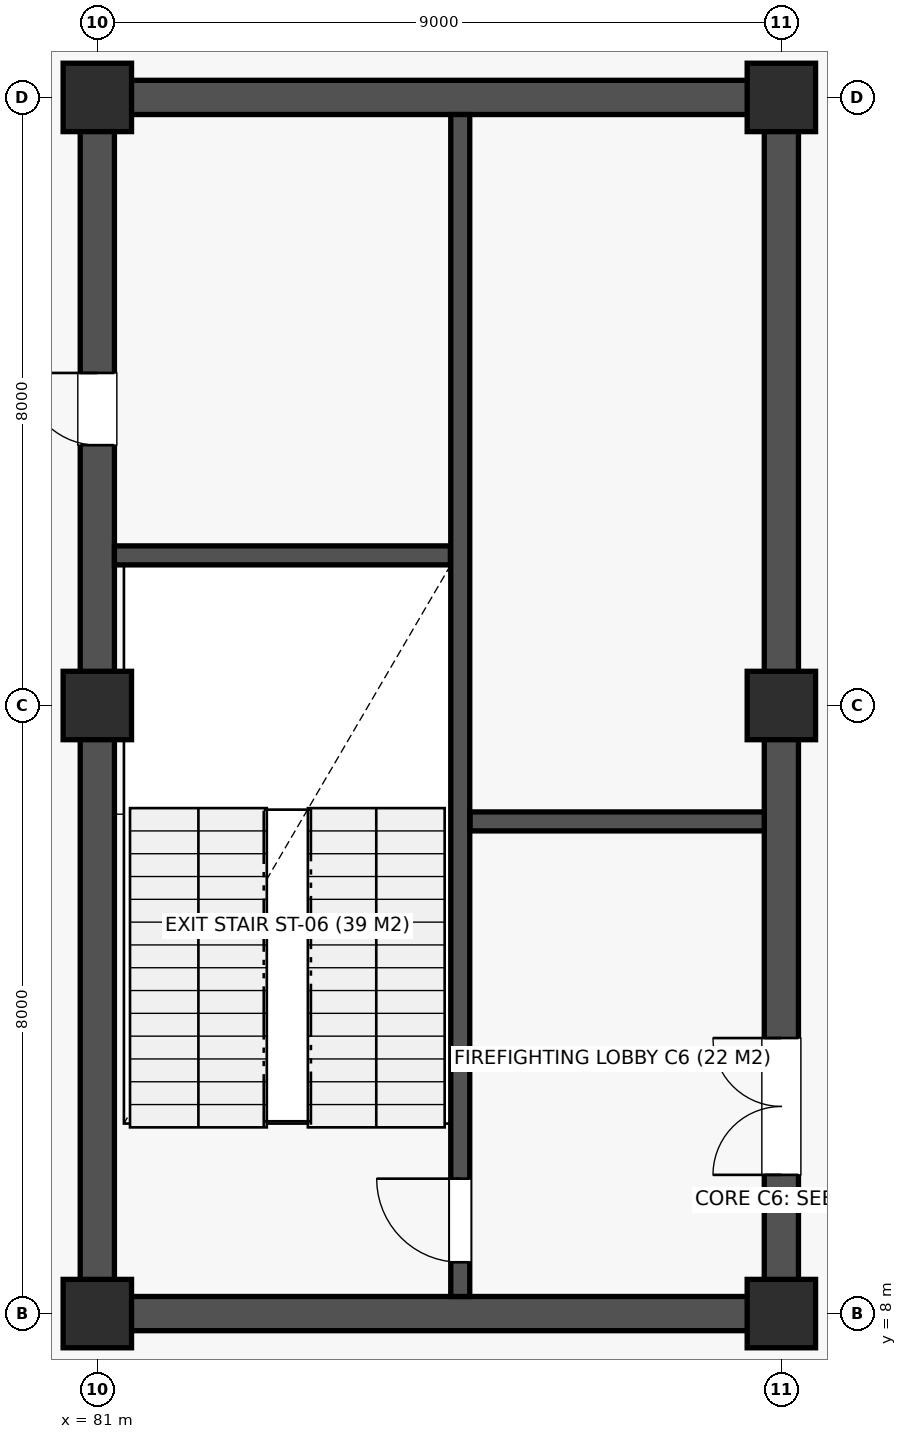
"""IFC4 building model, lengths in metres.
Left out: names, types, materials, properties, quantities, classifications, styles, units other than length and angle.
Written with IfcOpenShell. Run it as: python <this file> out.ifc"""

import sys

from ifc_helpers import new_model, si_unit, direction, frame, frame_2d, origin, origin_2d, place, context, subcontext, project, spatial, rectangle, extrude, element, fill, save


model = new_model("IFC4")
c1 = context("Model", 3, precision=1e-05, world=origin(), true_north=direction((0.0, 1.0)))
c2 = subcontext(c1, "Body", "Model", "MODEL_VIEW")
j1 = project(units=[si_unit("LENGTHUNIT", "METRE"), si_unit("PLANEANGLEUNIT", "RADIAN")], contexts=[c1])
p1 = place(None, origin())
s1 = spatial("IfcSite", under=j1, at=p1, CompositionType="ELEMENT")
p2 = place(p1, origin())
s2 = spatial("IfcBuilding", under=s1, at=p2, CompositionType="ELEMENT")
p3 = place(p2, frame((0.0, 0.0, -4.5)))
s3 = spatial("IfcBuildingStorey", under=s2, at=p3, CompositionType="ELEMENT", Elevation=-4.5)
for number, where, z_axis, x_axis in (
    (1, (81.0, 8.0, 0.0), (0.0, 0.0, 1.0), (1.0, 0.0, 0.0)),
    (2, (81.0, 16.0, 0.0), (0.0, 0.0, 1.0), (1.0, 0.0, 0.0)),
    (3, (81.0, 24.0, 0.0), (0.0, 0.0, 1.0), (1.0, 0.0, 0.0)),
    (4, (90.0, 8.0, 0.0), (0.0, 0.0, 1.0), (1.0, 0.0, 0.0)),
    (5, (90.0, 16.0, 0.0), (0.0, 0.0, 1.0), (1.0, 0.0, 0.0)),
    (6, (90.0, 24.0, 0.0), (0.0, 0.0, 1.0), (1.0, 0.0, 0.0)),
):
    element("IfcColumn", number, at=place(p3, frame(where, z_axis=z_axis, x_axis=x_axis)), inside=s3, PredefinedType="COLUMN", context=c2, shape_type="SweptSolid", body=[
        extrude(rectangle(XDim=0.9, YDim=0.9, at=origin_2d()), origin(), (0.0, 0.0, 1.0), 4.5),
    ])
for number, where, z_axis, x_axis in (
    (7, (81.225, 8.0, 0.0), (0.0, 0.0, 1.0), (1.0, 0.0, 0.0)),
    (8, (81.225, 24.0, 0.0), (0.0, 0.0, 1.0), (1.0, 0.0, 0.0)),
):
    element("IfcWall", number, at=place(p3, frame(where, z_axis=z_axis, x_axis=x_axis)), inside=s3, PredefinedType="SHEAR", context=c2, shape_type="SweptSolid", body=[
        extrude(rectangle(XDim=8.55, YDim=0.45, at=frame_2d((4.275, 0.0))), origin(), (0.0, 0.0, 1.0), 4.15),
    ])
p4 = place(p3, frame((81.0, 8.225, 0.0), z_axis=(0.0, 0.0, 1.0), x_axis=(0.0, 1.0, 0.0)))
e9 = element("IfcWall", 9, at=p4, inside=s3, PredefinedType="SHEAR", context=c2, shape_type="SweptSolid", body=[
    extrude(rectangle(XDim=15.55, YDim=0.45, at=frame_2d((7.775, 0.0))), origin(), (0.0, 0.0, 1.0), 4.15),
])
p5 = place(p4, frame((11.2, 0.0, 0.0)))
e10 = element("IfcOpeningElement", 10, at=p5, cuts=e9, PredefinedType="OPENING", context=c2, shape_type="SweptSolid", body=[
    extrude(rectangle(XDim=0.95, YDim=2.1, at=frame_2d((0.475, 1.05))), frame((0.0, 0.237, 0.0), z_axis=(0.0, -1.0, 0.0), x_axis=(1.0, 0.0, 0.0)), (0.0, 0.0, 1.0), 0.474),
])
p6 = place(p3, frame((90.0, 8.225, 0.0), z_axis=(0.0, 0.0, 1.0), x_axis=(0.0, 1.0, 0.0)))
e11 = element("IfcWall", 11, at=p6, inside=s3, PredefinedType="SHEAR", context=c2, shape_type="SweptSolid", body=[
    extrude(rectangle(XDim=15.55, YDim=0.45, at=frame_2d((7.775, 0.0))), origin(), (0.0, 0.0, 1.0), 4.15),
])
p7 = place(p6, frame((1.6, 0.0, 0.0)))
e12 = element("IfcOpeningElement", 12, at=p7, cuts=e11, PredefinedType="OPENING", context=c2, shape_type="SweptSolid", body=[
    extrude(rectangle(XDim=1.8, YDim=2.18, at=frame_2d((0.9, 1.09))), frame((0.0, 0.237, 0.0), z_axis=(0.0, -1.0, 0.0), x_axis=(1.0, 0.0, 0.0)), (0.0, 0.0, 1.0), 0.474),
])
p8 = place(p3, frame((85.775, 8.225, 0.0), z_axis=(0.0, 0.0, 1.0), x_axis=(0.0, 1.0, 0.0)))
e13 = element("IfcWall", 13, at=p8, inside=s3, PredefinedType="SOLIDWALL", context=c2, shape_type="SweptSolid", body=[
    extrude(rectangle(XDim=15.55, YDim=0.25, at=frame_2d((7.775, 0.0))), origin(), (0.0, 0.0, 1.0), 4.15),
])
p9 = place(p8, frame((0.45, 0.0, 0.0)))
e14 = element("IfcOpeningElement", 14, at=p9, cuts=e13, PredefinedType="OPENING", context=c2, shape_type="SweptSolid", body=[
    extrude(rectangle(XDim=1.1, YDim=2.15, at=frame_2d((0.55, 1.075))), frame((0.0, 0.137, 0.0), z_axis=(0.0, -1.0, 0.0), x_axis=(1.0, 0.0, 0.0)), (0.0, 0.0, 1.0), 0.274),
])
p10 = place(p3, frame((81.225, 17.975, 0.0), z_axis=(0.0, 0.0, 1.0), x_axis=(1.0, 0.0, 0.0)))
e15 = element("IfcWall", 15, at=p10, inside=s3, PredefinedType="SOLIDWALL", context=c2, shape_type="SweptSolid", body=[
    extrude(rectangle(XDim=4.42, YDim=0.25, at=frame_2d((2.21, 0.0))), origin(), (0.0, 0.0, 1.0), 4.15),
])
p11 = place(p3, frame((85.905, 14.475, 0.0), z_axis=(0.0, 0.0, 1.0), x_axis=(1.0, 0.0, 0.0)))
e16 = element("IfcWall", 16, at=p11, inside=s3, PredefinedType="SOLIDWALL", context=c2, shape_type="SweptSolid", body=[
    extrude(rectangle(XDim=3.87, YDim=0.25, at=frame_2d((1.935, 0.0))), origin(), (0.0, 0.0, 1.0), 4.15),
])
p12 = place(p7, origin())
e17 = element("IfcDoor", 17, at=p12, inside=s3, OperationType="DOUBLE_DOOR_SINGLE_SWING", PredefinedType="DOOR", context=c2, shape_type="SweptSolid", body=[
    extrude(rectangle(XDim=1.8, YDim=2.18, at=frame_2d((0.9, 1.09))), frame((0.0, 0.025, 0.0), z_axis=(0.0, -1.0, 0.0), x_axis=(1.0, 0.0, 0.0)), (0.0, 0.0, 1.0), 0.05),
])
fill(e12, e17)
p13 = place(p9, origin())
e18 = element("IfcDoor", 18, at=p13, inside=s3, OperationType="SINGLE_SWING_RIGHT", PredefinedType="DOOR", context=c2, shape_type="SweptSolid", body=[
    extrude(rectangle(XDim=1.1, YDim=2.15, at=frame_2d((0.55, 1.075))), frame((0.0, 0.025, 0.0), z_axis=(0.0, -1.0, 0.0), x_axis=(1.0, 0.0, 0.0)), (0.0, 0.0, 1.0), 0.05),
])
fill(e14, e18)
p14 = place(p5, origin())
e19 = element("IfcDoor", 19, at=p14, inside=s3, OperationType="SINGLE_SWING_RIGHT", PredefinedType="DOOR", context=c2, shape_type="SweptSolid", body=[
    extrude(rectangle(XDim=0.95, YDim=2.1, at=frame_2d((0.475, 1.05))), frame((0.0, 0.025, 0.0), z_axis=(0.0, -1.0, 0.0), x_axis=(1.0, 0.0, 0.0)), (0.0, 0.0, 1.0), 0.05),
])
fill(e10, e19)
save(model, sys.argv[1])
